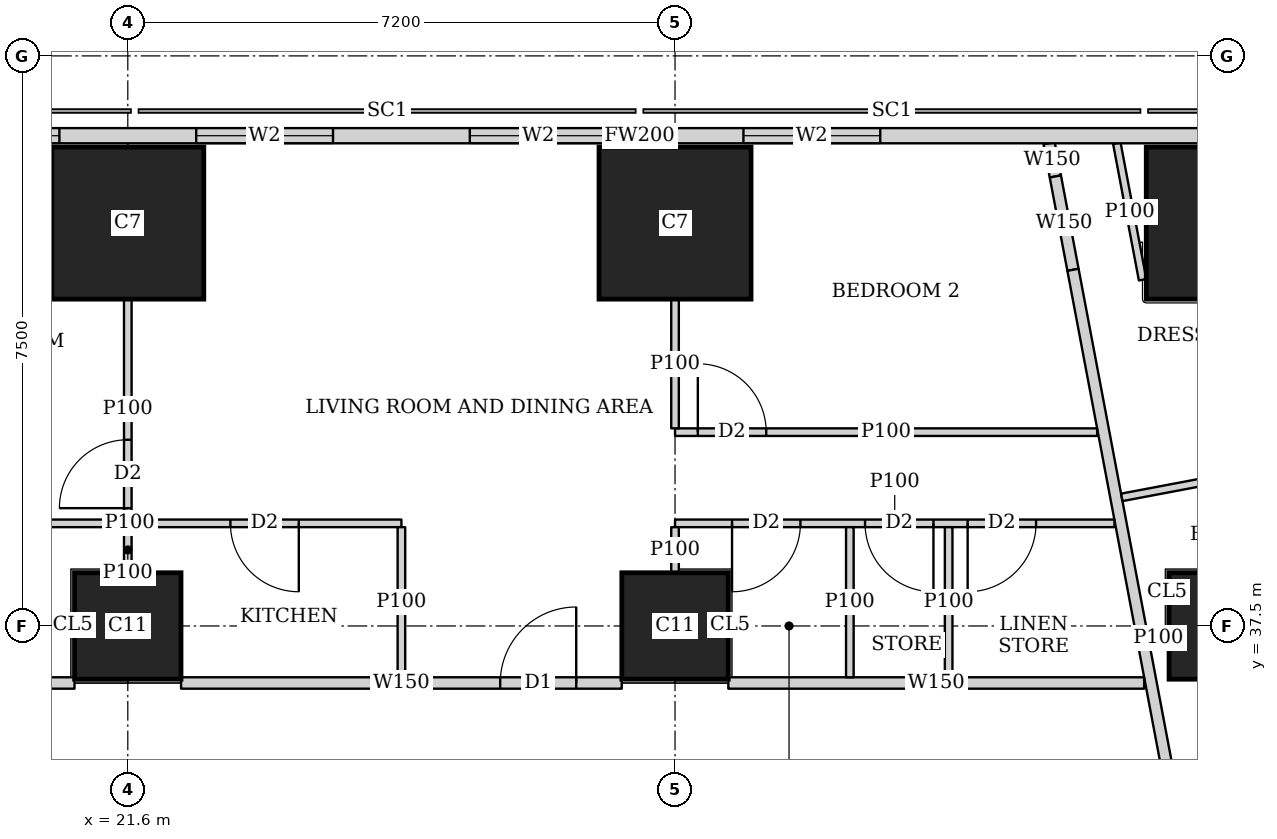
"""IFC4 building model, lengths in metres.
Left out: names, types, materials, properties, quantities, classifications, styles, units other than length and angle.
Written with IfcOpenShell. Run it as: python <this file> out.ifc"""

import sys

from ifc_helpers import new_model, si_unit, direction, frame, frame_2d, origin, origin_2d, place, context, subcontext, project, spatial, rectangle, extrude, element, fill, save


model = new_model("IFC4")
c1 = context("Model", 3, precision=1e-05, world=origin(), true_north=direction((0.0, 1.0)))
c2 = subcontext(c1, "Body", "Model", "MODEL_VIEW")
j1 = project(units=[si_unit("LENGTHUNIT", "METRE"), si_unit("PLANEANGLEUNIT", "RADIAN")], contexts=[c1])
p1 = place(None, origin())
s1 = spatial("IfcSite", under=j1, at=p1, CompositionType="ELEMENT")
p2 = place(p1, origin())
s2 = spatial("IfcBuilding", under=s1, at=p2, CompositionType="ELEMENT")
p3 = place(p2, frame((0.0, 0.0, 285.35)))
s3 = spatial("IfcBuildingStorey", under=s2, at=p3, CompositionType="ELEMENT", Elevation=285.35)
for number, where, z_axis, x_axis in (
    (1, (21.6, 37.5, 0.0), (0.0, 0.0, 1.0), (1.0, 0.0, 0.0)),
    (2, (28.8, 37.5, 0.0), (0.0, 0.0, 1.0), (1.0, 0.0, 0.0)),
    (3, (36.0, 37.5, 0.0), (0.0, 0.0, 1.0), (1.0, 0.0, 0.0)),
):
    element("IfcColumn", number, at=place(p3, frame(where, z_axis=z_axis, x_axis=x_axis)), inside=s3, PredefinedType="COLUMN", context=c2, shape_type="SweptSolid", body=[
        extrude(rectangle(XDim=1.4, YDim=1.4, at=origin_2d()), origin(), (0.0, 0.0, 1.0), 3.75),
    ])
for number, where, z_axis, x_axis in (
    (4, (21.6, 42.8, 0.0), (0.0, 0.0, 1.0), (1.0, 0.0, 0.0)),
    (5, (28.8, 42.8, 0.0), (0.0, 0.0, 1.0), (1.0, 0.0, 0.0)),
    (6, (36.0, 42.8, 0.0), (0.0, 0.0, 1.0), (1.0, 0.0, 0.0)),
):
    element("IfcColumn", number, at=place(p3, frame(where, z_axis=z_axis, x_axis=x_axis)), inside=s3, PredefinedType="COLUMN", context=c2, shape_type="SweptSolid", body=[
        extrude(rectangle(XDim=2.0, YDim=2.0, at=origin_2d()), origin(), (0.0, 0.0, 1.0), 3.75),
    ])
p4 = place(p3, frame((42.103, 43.95, 0.0), z_axis=(0.0, 0.0, 1.0), x_axis=(-1.0, 0.0, 0.0)))
e7 = element("IfcWall", 7, at=p4, inside=s3, PredefinedType="SOLIDWALL", context=c2, shape_type="SweptSolid", body=[
    extrude(rectangle(XDim=27.54, YDim=0.2, at=frame_2d((13.77, 0.0))), origin(), (0.0, 0.0, 1.0), 3.5),
])
p5 = place(p4, frame((10.603, 0.0, 0.9)))
e8 = element("IfcOpeningElement", 8, at=p5, cuts=e7, PredefinedType="OPENING", context=c2, shape_type="SweptSolid", body=[
    extrude(rectangle(XDim=1.8, YDim=1.5, at=frame_2d((0.9, 0.75))), frame((0.0, 0.11, 0.0), z_axis=(0.0, -1.0, 0.0), x_axis=(1.0, 0.0, 0.0)), (0.0, 0.0, 1.0), 0.22),
])
p6 = place(p4, frame((14.203, 0.0, 0.9)))
e9 = element("IfcOpeningElement", 9, at=p6, cuts=e7, PredefinedType="OPENING", context=c2, shape_type="SweptSolid", body=[
    extrude(rectangle(XDim=1.8, YDim=1.5, at=frame_2d((0.9, 0.75))), frame((0.0, 0.11, 0.0), z_axis=(0.0, -1.0, 0.0), x_axis=(1.0, 0.0, 0.0)), (0.0, 0.0, 1.0), 0.22),
])
p7 = place(p4, frame((17.803, 0.0, 0.9)))
e10 = element("IfcOpeningElement", 10, at=p7, cuts=e7, PredefinedType="OPENING", context=c2, shape_type="SweptSolid", body=[
    extrude(rectangle(XDim=1.8, YDim=1.5, at=frame_2d((0.9, 0.75))), frame((0.0, 0.11, 0.0), z_axis=(0.0, -1.0, 0.0), x_axis=(1.0, 0.0, 0.0)), (0.0, 0.0, 1.0), 0.22),
])
p8 = place(p4, frame((21.403, 0.0, 0.9)))
e11 = element("IfcOpeningElement", 11, at=p8, cuts=e7, PredefinedType="OPENING", context=c2, shape_type="SweptSolid", body=[
    extrude(rectangle(XDim=1.8, YDim=1.5, at=frame_2d((0.9, 0.75))), frame((0.0, 0.11, 0.0), z_axis=(0.0, -1.0, 0.0), x_axis=(1.0, 0.0, 0.0)), (0.0, 0.0, 1.0), 0.22),
])
p9 = place(p3, frame((16.001, 36.75, 0.0), z_axis=(0.0, 0.0, 1.0), x_axis=(1.0, 0.0, 0.0)))
e12 = element("IfcWall", 12, at=p9, inside=s3, PredefinedType="SOLIDWALL", context=c2, shape_type="SweptSolid", body=[
    extrude(rectangle(XDim=4.898, YDim=0.15, at=frame_2d((2.449, 0.0))), origin(), (0.0, 0.0, 1.0), 3.5),
])
p10 = place(p3, frame((22.301, 36.75, 0.0), z_axis=(0.0, 0.0, 1.0), x_axis=(1.0, 0.0, 0.0)))
e13 = element("IfcWall", 13, at=p10, inside=s3, PredefinedType="SOLIDWALL", context=c2, shape_type="SweptSolid", body=[
    extrude(rectangle(XDim=5.798, YDim=0.15, at=frame_2d((2.899, 0.0))), origin(), (0.0, 0.0, 1.0), 3.5),
])
p11 = place(p10, frame((4.199, 0.0, 0.0)))
e14 = element("IfcOpeningElement", 14, at=p11, cuts=e13, PredefinedType="OPENING", context=c2, shape_type="SweptSolid", body=[
    extrude(rectangle(XDim=1.0, YDim=2.1, at=frame_2d((0.5, 1.05))), frame((0.0, 0.085, 0.0), z_axis=(0.0, -1.0, 0.0), x_axis=(1.0, 0.0, 0.0)), (0.0, 0.0, 1.0), 0.17),
])
p12 = place(p3, frame((29.501, 36.75, 0.0), z_axis=(0.0, 0.0, 1.0), x_axis=(1.0, 0.0, 0.0)))
e15 = element("IfcWall", 15, at=p12, inside=s3, PredefinedType="SOLIDWALL", context=c2, shape_type="SweptSolid", body=[
    extrude(rectangle(XDim=5.471, YDim=0.15, at=frame_2d((2.735, 0.0))), origin(), (0.0, 0.0, 1.0), 3.5),
])
p13 = place(p3, frame((33.722, 43.85, 0.0), z_axis=(0.0, 0.0, 1.0), x_axis=(0.184886516626, -0.982759877066, 0.0)))
e16 = element("IfcWall", 16, at=p13, inside=s3, PredefinedType="SOLIDWALL", context=c2, shape_type="SweptSolid", body=[
    extrude(rectangle(XDim=0.444, YDim=0.15, at=frame_2d((0.222, 0.0))), origin(), (0.0, 0.0, 1.0), 3.5),
])
p14 = place(p3, frame((33.804, 43.414, 0.0), z_axis=(0.0, 0.0, 1.0), x_axis=(0.185585816539, -0.982628060204, 0.0)))
e17 = element("IfcWall", 17, at=p14, inside=s3, PredefinedType="SOLIDWALL", context=c2, shape_type="SweptSolid", body=[
    extrude(rectangle(XDim=1.25, YDim=0.15, at=frame_2d((0.625, 0.0))), origin(), (0.0, 0.0, 1.0), 2.05),
])
p15 = place(p3, frame((34.036, 42.186, 0.0), z_axis=(0.0, 0.0, 1.0), x_axis=(0.185593518645, -0.9826266055, 0.0)))
e18 = element("IfcWall", 18, at=p15, inside=s3, PredefinedType="SOLIDWALL", context=c2, shape_type="SweptSolid", body=[
    extrude(rectangle(XDim=35.961, YDim=0.15, at=frame_2d((17.98, 0.0))), origin(), (0.0, 0.0, 1.0), 2.5),
])
p16 = place(p15, frame((19.345, 0.0, 0.0)))
e19 = element("IfcOpeningElement", 19, at=p16, cuts=e18, PredefinedType="OPENING", context=c2, shape_type="SweptSolid", body=[
    extrude(rectangle(XDim=1.0, YDim=2.1, at=frame_2d((0.5, 1.05))), frame((0.0, 0.085, 0.0), z_axis=(0.0, -1.0, 0.0), x_axis=(1.0, 0.0, 0.0)), (0.0, 0.0, 1.0), 0.17),
])
p17 = place(p15, frame((33.774, 0.0, 0.0)))
e20 = element("IfcOpeningElement", 20, at=p17, cuts=e18, PredefinedType="OPENING", context=c2, shape_type="SweptSolid", body=[
    extrude(rectangle(XDim=1.0, YDim=2.1, at=frame_2d((0.5, 1.05))), frame((0.0, 0.085, 0.0), z_axis=(0.0, -1.0, 0.0), x_axis=(1.0, 0.0, 0.0)), (0.0, 0.0, 1.0), 0.17),
])
p18 = place(p3, frame((34.952, 42.055, 0.0), z_axis=(0.0, 0.0, 1.0), x_axis=(-0.185490642006, 0.98264603074, 0.0)))
e21 = element("IfcWall", 21, at=p18, inside=s3, PredefinedType="PARTITIONING", context=c2, shape_type="SweptSolid", body=[
    extrude(rectangle(XDim=1.827, YDim=0.1, at=frame_2d((0.914, 0.0))), origin(), (0.0, 0.0, 1.0), 2.05),
])
p19 = place(p3, frame((37.896, 39.8, 0.0), z_axis=(0.0, 0.0, 1.0), x_axis=(-0.982607026909, -0.185697147715, 0.0)))
e22 = element("IfcWall", 22, at=p19, inside=s3, PredefinedType="PARTITIONING", context=c2, shape_type="SweptSolid", body=[
    extrude(rectangle(XDim=3.275, YDim=0.1, at=frame_2d((1.637, 0.0))), origin(), (0.0, 0.0, 1.0), 3.5),
])
p20 = place(p3, frame((35.29, 37.366, 0.0), z_axis=(0.0, 0.0, 1.0), x_axis=(-0.982395465615, -0.18681313963, 0.0)))
e23 = element("IfcWall", 23, at=p20, inside=s3, PredefinedType="PARTITIONING", context=c2, shape_type="SweptSolid", body=[
    extrude(rectangle(XDim=0.263, YDim=0.1, at=frame_2d((0.131, 0.0))), origin(), (0.0, 0.0, 1.0), 3.5),
])
p21 = place(p3, frame((21.6, 38.9, 0.0), z_axis=(0.0, 0.0, 1.0), x_axis=(0.0, 1.0, 0.0)))
e24 = element("IfcWall", 24, at=p21, inside=s3, PredefinedType="PARTITIONING", context=c2, shape_type="SweptSolid", body=[
    extrude(rectangle(XDim=2.899, YDim=0.1, at=frame_2d((1.45, 0.0))), origin(), (0.0, 0.0, 1.0), 3.5),
])
p22 = place(p21, frame((0.15, 0.0, 0.0)))
e25 = element("IfcOpeningElement", 25, at=p22, cuts=e24, PredefinedType="OPENING", context=c2, shape_type="SweptSolid", body=[
    extrude(rectangle(XDim=0.9, YDim=2.1, at=frame_2d((0.45, 1.05))), frame((0.0, 0.06, 0.0), z_axis=(0.0, -1.0, 0.0), x_axis=(1.0, 0.0, 0.0)), (0.0, 0.0, 1.0), 0.12),
])
p23 = place(p3, frame((28.8, 40.1, 0.0), z_axis=(0.0, 0.0, 1.0), x_axis=(0.0, 1.0, 0.0)))
e26 = element("IfcWall", 26, at=p23, inside=s3, PredefinedType="PARTITIONING", context=c2, shape_type="SweptSolid", body=[
    extrude(rectangle(XDim=1.699, YDim=0.1, at=frame_2d((0.85, 0.0))), origin(), (0.0, 0.0, 1.0), 3.5),
])
p24 = place(p3, frame((21.6, 38.201, 0.0), z_axis=(0.0, 0.0, 1.0), x_axis=(0.0, 1.0, 0.0)))
e27 = element("IfcWall", 27, at=p24, inside=s3, PredefinedType="PARTITIONING", context=c2, shape_type="SweptSolid", body=[
    extrude(rectangle(XDim=0.599, YDim=0.1, at=frame_2d((0.3, 0.0))), origin(), (0.0, 0.0, 1.0), 3.5),
])
p25 = place(p3, frame((25.2, 36.825, 0.0), z_axis=(0.0, 0.0, 1.0), x_axis=(0.0, 1.0, 0.0)))
e28 = element("IfcWall", 28, at=p25, inside=s3, PredefinedType="PARTITIONING", context=c2, shape_type="SweptSolid", body=[
    extrude(rectangle(XDim=1.975, YDim=0.1, at=frame_2d((0.988, 0.0))), origin(), (0.0, 0.0, 1.0), 3.5),
])
p26 = place(p3, frame((28.8, 38.201, 0.0), z_axis=(0.0, 0.0, 1.0), x_axis=(0.0, 1.0, 0.0)))
e29 = element("IfcWall", 29, at=p26, inside=s3, PredefinedType="PARTITIONING", context=c2, shape_type="SweptSolid", body=[
    extrude(rectangle(XDim=0.599, YDim=0.1, at=frame_2d((0.3, 0.0))), origin(), (0.0, 0.0, 1.0), 3.5),
])
for number, where, z_axis, x_axis in (
    (30, (32.4, 36.825, 0.0), (0.0, 0.0, 1.0), (0.0, 1.0, 0.0)),
    (31, (31.1, 36.825, 0.0), (0.0, 0.0, 1.0), (0.0, 1.0, 0.0)),
):
    element("IfcWall", number, at=place(p3, frame(where, z_axis=z_axis, x_axis=x_axis)), inside=s3, PredefinedType="PARTITIONING", context=c2, shape_type="SweptSolid", body=[
        extrude(rectangle(XDim=1.975, YDim=0.1, at=frame_2d((0.988, 0.0))), origin(), (0.0, 0.0, 1.0), 3.5),
    ])
p27 = place(p3, frame((18.05, 38.85, 0.0), z_axis=(0.0, 0.0, 1.0), x_axis=(1.0, 0.0, 0.0)))
e32 = element("IfcWall", 32, at=p27, inside=s3, PredefinedType="PARTITIONING", context=c2, shape_type="SweptSolid", body=[
    extrude(rectangle(XDim=7.15, YDim=0.1, at=frame_2d((3.575, 0.0))), origin(), (0.0, 0.0, 1.0), 3.5),
])
p28 = place(p27, frame((1.3, 0.0, 0.0)))
e33 = element("IfcOpeningElement", 33, at=p28, cuts=e32, PredefinedType="OPENING", context=c2, shape_type="SweptSolid", body=[
    extrude(rectangle(XDim=0.9, YDim=2.1, at=frame_2d((0.45, 1.05))), frame((0.0, 0.06, 0.0), z_axis=(0.0, -1.0, 0.0), x_axis=(1.0, 0.0, 0.0)), (0.0, 0.0, 1.0), 0.12),
])
p29 = place(p27, frame((4.9, 0.0, 0.0)))
e34 = element("IfcOpeningElement", 34, at=p29, cuts=e32, PredefinedType="OPENING", context=c2, shape_type="SweptSolid", body=[
    extrude(rectangle(XDim=0.9, YDim=2.1, at=frame_2d((0.45, 1.05))), frame((0.0, 0.06, 0.0), z_axis=(0.0, -1.0, 0.0), x_axis=(1.0, 0.0, 0.0)), (0.0, 0.0, 1.0), 0.12),
])
p30 = place(p3, frame((28.8, 38.85, 0.0), z_axis=(0.0, 0.0, 1.0), x_axis=(1.0, 0.0, 0.0)))
e35 = element("IfcWall", 35, at=p30, inside=s3, PredefinedType="PARTITIONING", context=c2, shape_type="SweptSolid", body=[
    extrude(rectangle(XDim=5.781, YDim=0.1, at=frame_2d((2.891, 0.0))), origin(), (0.0, 0.0, 1.0), 3.5),
])
p31 = place(p30, frame((0.75, 0.0, 0.0)))
e36 = element("IfcOpeningElement", 36, at=p31, cuts=e35, PredefinedType="OPENING", context=c2, shape_type="SweptSolid", body=[
    extrude(rectangle(XDim=0.9, YDim=2.1, at=frame_2d((0.45, 1.05))), frame((0.0, 0.06, 0.0), z_axis=(0.0, -1.0, 0.0), x_axis=(1.0, 0.0, 0.0)), (0.0, 0.0, 1.0), 0.12),
])
p32 = place(p30, frame((2.5, 0.0, 0.0)))
e37 = element("IfcOpeningElement", 37, at=p32, cuts=e35, PredefinedType="OPENING", context=c2, shape_type="SweptSolid", body=[
    extrude(rectangle(XDim=0.9, YDim=2.1, at=frame_2d((0.45, 1.05))), frame((0.0, 0.06, 0.0), z_axis=(0.0, -1.0, 0.0), x_axis=(1.0, 0.0, 0.0)), (0.0, 0.0, 1.0), 0.12),
])
p33 = place(p30, frame((3.85, 0.0, 0.0)))
e38 = element("IfcOpeningElement", 38, at=p33, cuts=e35, PredefinedType="OPENING", context=c2, shape_type="SweptSolid", body=[
    extrude(rectangle(XDim=0.9, YDim=2.1, at=frame_2d((0.45, 1.05))), frame((0.0, 0.06, 0.0), z_axis=(0.0, -1.0, 0.0), x_axis=(1.0, 0.0, 0.0)), (0.0, 0.0, 1.0), 0.12),
])
p34 = place(p3, frame((28.8, 40.05, 0.0), z_axis=(0.0, 0.0, 1.0), x_axis=(1.0, 0.0, 0.0)))
e39 = element("IfcWall", 39, at=p34, inside=s3, PredefinedType="PARTITIONING", context=c2, shape_type="SweptSolid", body=[
    extrude(rectangle(XDim=5.554, YDim=0.1, at=frame_2d((2.777, 0.0))), origin(), (0.0, 0.0, 1.0), 3.5),
])
p35 = place(p34, frame((0.3, 0.0, 0.0)))
e40 = element("IfcOpeningElement", 40, at=p35, cuts=e39, PredefinedType="OPENING", context=c2, shape_type="SweptSolid", body=[
    extrude(rectangle(XDim=0.9, YDim=2.1, at=frame_2d((0.45, 1.05))), frame((0.0, 0.06, 0.0), z_axis=(0.0, -1.0, 0.0), x_axis=(1.0, 0.0, 0.0)), (0.0, 0.0, 1.0), 0.12),
])
p36 = place(p5, origin())
e41 = element("IfcWindow", 41, at=p36, inside=s3, PartitioningType="SINGLE_PANEL", PredefinedType="WINDOW", context=c2, shape_type="SweptSolid", body=[
    extrude(rectangle(XDim=1.8, YDim=1.5, at=frame_2d((0.9, 0.75))), frame((0.0, 0.03, 0.0), z_axis=(0.0, -1.0, 0.0), x_axis=(1.0, 0.0, 0.0)), (0.0, 0.0, 1.0), 0.06),
])
fill(e8, e41)
p37 = place(p6, origin())
e42 = element("IfcWindow", 42, at=p37, inside=s3, PartitioningType="SINGLE_PANEL", PredefinedType="WINDOW", context=c2, shape_type="SweptSolid", body=[
    extrude(rectangle(XDim=1.8, YDim=1.5, at=frame_2d((0.9, 0.75))), frame((0.0, 0.03, 0.0), z_axis=(0.0, -1.0, 0.0), x_axis=(1.0, 0.0, 0.0)), (0.0, 0.0, 1.0), 0.06),
])
fill(e9, e42)
p38 = place(p7, origin())
e43 = element("IfcWindow", 43, at=p38, inside=s3, PartitioningType="SINGLE_PANEL", PredefinedType="WINDOW", context=c2, shape_type="SweptSolid", body=[
    extrude(rectangle(XDim=1.8, YDim=1.5, at=frame_2d((0.9, 0.75))), frame((0.0, 0.03, 0.0), z_axis=(0.0, -1.0, 0.0), x_axis=(1.0, 0.0, 0.0)), (0.0, 0.0, 1.0), 0.06),
])
fill(e10, e43)
p39 = place(p8, origin())
e44 = element("IfcWindow", 44, at=p39, inside=s3, PartitioningType="SINGLE_PANEL", PredefinedType="WINDOW", context=c2, shape_type="SweptSolid", body=[
    extrude(rectangle(XDim=1.8, YDim=1.5, at=frame_2d((0.9, 0.75))), frame((0.0, 0.03, 0.0), z_axis=(0.0, -1.0, 0.0), x_axis=(1.0, 0.0, 0.0)), (0.0, 0.0, 1.0), 0.06),
])
fill(e11, e44)
p40 = place(p22, origin())
e45 = element("IfcDoor", 45, at=p40, inside=s3, OperationType="SINGLE_SWING_LEFT", PredefinedType="DOOR", context=c2, shape_type="SweptSolid", body=[
    extrude(rectangle(XDim=0.9, YDim=2.1, at=frame_2d((0.45, 1.05))), frame((0.0, 0.025, 0.0), z_axis=(0.0, -1.0, 0.0), x_axis=(1.0, 0.0, 0.0)), (0.0, 0.0, 1.0), 0.05),
])
fill(e25, e45)
p41 = place(p29, origin())
e46 = element("IfcDoor", 46, at=p41, inside=s3, OperationType="SINGLE_SWING_LEFT", PredefinedType="DOOR", context=c2, shape_type="SweptSolid", body=[
    extrude(rectangle(XDim=0.9, YDim=2.1, at=frame_2d((0.45, 1.05))), frame((0.0, 0.025, 0.0), z_axis=(0.0, -1.0, 0.0), x_axis=(1.0, 0.0, 0.0)), (0.0, 0.0, 1.0), 0.05),
])
fill(e34, e46)
p42 = place(p35, origin())
e47 = element("IfcDoor", 47, at=p42, inside=s3, OperationType="SINGLE_SWING_LEFT", PredefinedType="DOOR", context=c2, shape_type="SweptSolid", body=[
    extrude(rectangle(XDim=0.9, YDim=2.1, at=frame_2d((0.45, 1.05))), frame((0.0, 0.025, 0.0), z_axis=(0.0, -1.0, 0.0), x_axis=(1.0, 0.0, 0.0)), (0.0, 0.0, 1.0), 0.05),
])
fill(e40, e47)
p43 = place(p31, origin())
e48 = element("IfcDoor", 48, at=p43, inside=s3, OperationType="SINGLE_SWING_RIGHT", PredefinedType="DOOR", context=c2, shape_type="SweptSolid", body=[
    extrude(rectangle(XDim=0.9, YDim=2.1, at=frame_2d((0.45, 1.05))), frame((0.0, 0.025, 0.0), z_axis=(0.0, -1.0, 0.0), x_axis=(1.0, 0.0, 0.0)), (0.0, 0.0, 1.0), 0.05),
])
fill(e36, e48)
p44 = place(p32, origin())
e49 = element("IfcDoor", 49, at=p44, inside=s3, OperationType="SINGLE_SWING_LEFT", PredefinedType="DOOR", context=c2, shape_type="SweptSolid", body=[
    extrude(rectangle(XDim=0.9, YDim=2.1, at=frame_2d((0.45, 1.05))), frame((0.0, 0.025, 0.0), z_axis=(0.0, -1.0, 0.0), x_axis=(1.0, 0.0, 0.0)), (0.0, 0.0, 1.0), 0.05),
])
fill(e37, e49)
p45 = place(p33, origin())
e50 = element("IfcDoor", 50, at=p45, inside=s3, OperationType="SINGLE_SWING_RIGHT", PredefinedType="DOOR", context=c2, shape_type="SweptSolid", body=[
    extrude(rectangle(XDim=0.9, YDim=2.1, at=frame_2d((0.45, 1.05))), frame((0.0, 0.025, 0.0), z_axis=(0.0, -1.0, 0.0), x_axis=(1.0, 0.0, 0.0)), (0.0, 0.0, 1.0), 0.05),
])
fill(e38, e50)
p46 = place(p11, origin())
e51 = element("IfcDoor", 51, at=p46, inside=s3, OperationType="SINGLE_SWING_RIGHT", PredefinedType="DOOR", context=c2, shape_type="SweptSolid", body=[
    extrude(rectangle(XDim=1.0, YDim=2.1, at=frame_2d((0.5, 1.05))), frame((0.0, 0.025, 0.0), z_axis=(0.0, -1.0, 0.0), x_axis=(1.0, 0.0, 0.0)), (0.0, 0.0, 1.0), 0.05),
])
fill(e14, e51)
save(model, sys.argv[1])
